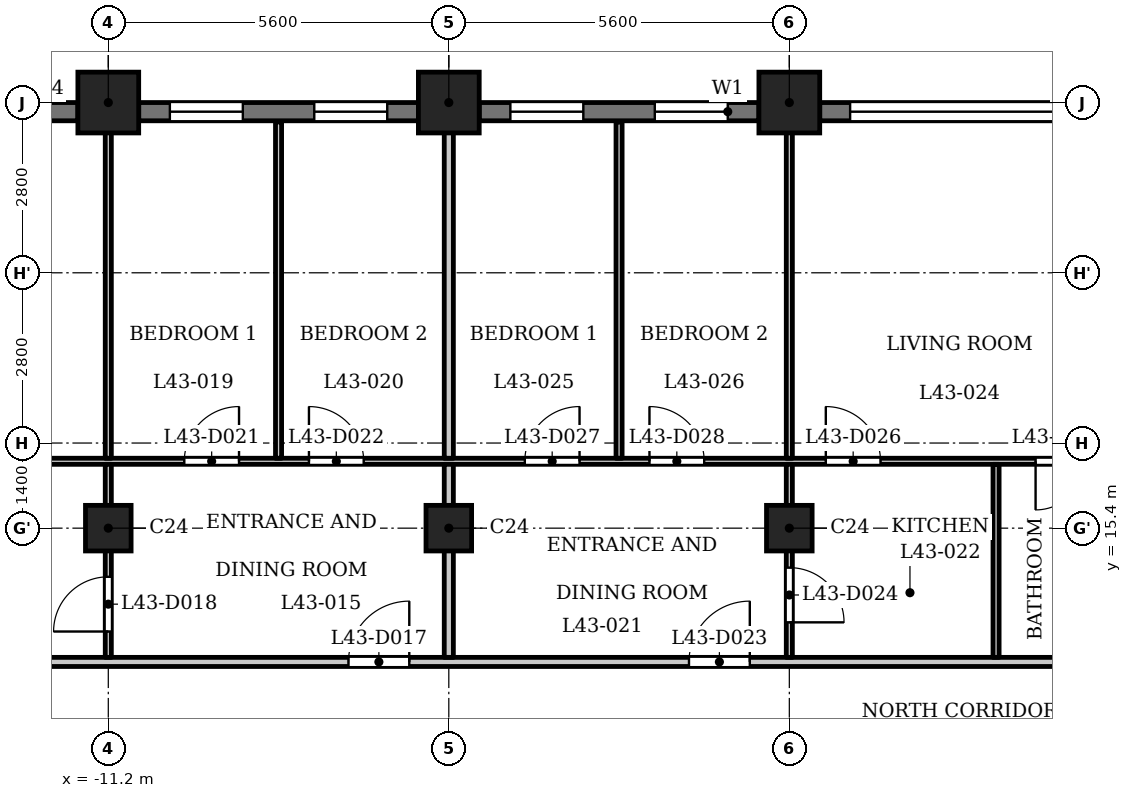
"""IFC4 building model, lengths in metres.
Left out: names, types, materials, properties, quantities, classifications, styles, units other than length and angle.
Written with IfcOpenShell. Run it as: python <this file> out.ifc"""

import sys

from ifc_helpers import new_model, si_unit, direction, frame, frame_2d, origin, origin_2d, place, context, subcontext, project, spatial, rectangle, extrude, element, fill, save


model = new_model("IFC4")
c1 = context("Model", 3, precision=1e-05, world=origin(), true_north=direction((0.0, 1.0)))
c2 = subcontext(c1, "Body", "Model", "MODEL_VIEW")
j1 = project(units=[si_unit("LENGTHUNIT", "METRE"), si_unit("PLANEANGLEUNIT", "RADIAN")], contexts=[c1])
p1 = place(None, origin())
s1 = spatial("IfcSite", under=j1, at=p1, CompositionType="ELEMENT")
p2 = place(p1, origin())
s2 = spatial("IfcBuilding", under=s1, at=p2, CompositionType="ELEMENT")
p3 = place(p2, frame((0.0, 0.0, 167.6)))
s3 = spatial("IfcBuildingStorey", under=s2, at=p3, CompositionType="ELEMENT", Elevation=167.6)
for number, where, z_axis, x_axis in (
    (1, (0.0, 22.4, 0.0), (0.0, 0.0, 1.0), (1.0, 0.0, 0.0)),
    (2, (-5.6, 22.4, 0.0), (0.0, 0.0, 1.0), (1.0, 0.0, 0.0)),
    (3, (-11.2, 22.4, 0.0), (0.0, 0.0, 1.0), (1.0, 0.0, 0.0)),
):
    element("IfcColumn", number, at=place(p3, frame(where, z_axis=z_axis, x_axis=x_axis)), inside=s3, PredefinedType="COLUMN", context=c2, shape_type="SweptSolid", body=[
        extrude(rectangle(XDim=1.0, YDim=1.0, at=origin_2d()), origin(), (0.0, 0.0, 1.0), 3.5),
    ])
for number, where, z_axis, x_axis in (
    (4, (-11.2, 15.4, 0.0), (0.0, 0.0, 1.0), (1.0, 0.0, 0.0)),
    (5, (-5.6, 15.4, 0.0), (0.0, 0.0, 1.0), (1.0, 0.0, 0.0)),
    (6, (0.0, 15.4, 0.0), (0.0, 0.0, 1.0), (1.0, 0.0, 0.0)),
):
    element("IfcColumn", number, at=place(p3, frame(where, z_axis=z_axis, x_axis=x_axis)), inside=s3, PredefinedType="COLUMN", context=c2, shape_type="SweptSolid", body=[
        extrude(rectangle(XDim=0.75, YDim=0.75, at=origin_2d()), origin(), (0.0, 0.0, 1.0), 3.5),
    ])
p4 = place(p3, frame((5.1, 22.25, 0.0), z_axis=(0.0, 0.0, 1.0), x_axis=(-1.0, 0.0, 0.0)))
e7 = element("IfcWall", 7, at=p4, inside=s3, PredefinedType="SOLIDWALL", context=c2, shape_type="SweptSolid", body=[
    extrude(rectangle(XDim=4.6, YDim=0.3, at=frame_2d((2.3, 0.0))), origin(), (0.0, 0.0, 1.0), 2.45),
])
p5 = place(p4, frame((0.5, 0.0, 1.2)))
e8 = element("IfcOpeningElement", 8, at=p5, cuts=e7, PredefinedType="OPENING", context=c2, shape_type="SweptSolid", body=[
    extrude(rectangle(XDim=3.6, YDim=0.95, at=frame_2d((1.8, 0.475))), frame((0.0, 0.16, 0.0), z_axis=(0.0, -1.0, 0.0), x_axis=(1.0, 0.0, 0.0)), (0.0, 0.0, 1.0), 0.32),
])
p6 = place(p3, frame((-0.5, 22.25, 0.0), z_axis=(0.0, 0.0, 1.0), x_axis=(-1.0, 0.0, 0.0)))
e9 = element("IfcWall", 9, at=p6, inside=s3, PredefinedType="SOLIDWALL", context=c2, shape_type="SweptSolid", body=[
    extrude(rectangle(XDim=4.6, YDim=0.3, at=frame_2d((2.3, 0.0))), origin(), (0.0, 0.0, 1.0), 2.45),
])
p7 = place(p6, frame((0.512, 0.0, 0.6)))
e10 = element("IfcOpeningElement", 10, at=p7, cuts=e9, PredefinedType="OPENING", context=c2, shape_type="SweptSolid", body=[
    extrude(rectangle(XDim=1.2, YDim=1.55, at=frame_2d((0.6, 0.775))), frame((0.0, 0.16, 0.0), z_axis=(0.0, -1.0, 0.0), x_axis=(1.0, 0.0, 0.0)), (0.0, 0.0, 1.0), 0.32),
])
p8 = place(p6, frame((2.887, 0.0, 0.6)))
e11 = element("IfcOpeningElement", 11, at=p8, cuts=e9, PredefinedType="OPENING", context=c2, shape_type="SweptSolid", body=[
    extrude(rectangle(XDim=1.2, YDim=1.55, at=frame_2d((0.6, 0.775))), frame((0.0, 0.16, 0.0), z_axis=(0.0, -1.0, 0.0), x_axis=(1.0, 0.0, 0.0)), (0.0, 0.0, 1.0), 0.32),
])
p9 = place(p3, frame((-6.1, 22.25, 0.0), z_axis=(0.0, 0.0, 1.0), x_axis=(-1.0, 0.0, 0.0)))
e12 = element("IfcWall", 12, at=p9, inside=s3, PredefinedType="SOLIDWALL", context=c2, shape_type="SweptSolid", body=[
    extrude(rectangle(XDim=4.6, YDim=0.3, at=frame_2d((2.3, 0.0))), origin(), (0.0, 0.0, 1.0), 2.45),
])
p10 = place(p9, frame((0.512, 0.0, 0.6)))
e13 = element("IfcOpeningElement", 13, at=p10, cuts=e12, PredefinedType="OPENING", context=c2, shape_type="SweptSolid", body=[
    extrude(rectangle(XDim=1.2, YDim=1.55, at=frame_2d((0.6, 0.775))), frame((0.0, 0.16, 0.0), z_axis=(0.0, -1.0, 0.0), x_axis=(1.0, 0.0, 0.0)), (0.0, 0.0, 1.0), 0.32),
])
p11 = place(p9, frame((2.887, 0.0, 0.6)))
e14 = element("IfcOpeningElement", 14, at=p11, cuts=e12, PredefinedType="OPENING", context=c2, shape_type="SweptSolid", body=[
    extrude(rectangle(XDim=1.2, YDim=1.55, at=frame_2d((0.6, 0.775))), frame((0.0, 0.16, 0.0), z_axis=(0.0, -1.0, 0.0), x_axis=(1.0, 0.0, 0.0)), (0.0, 0.0, 1.0), 0.32),
])
p12 = place(p3, frame((-11.7, 22.25, 0.0), z_axis=(0.0, 0.0, 1.0), x_axis=(-1.0, 0.0, 0.0)))
e15 = element("IfcWall", 15, at=p12, inside=s3, PredefinedType="SOLIDWALL", context=c2, shape_type="SweptSolid", body=[
    extrude(rectangle(XDim=4.6, YDim=0.3, at=frame_2d((2.3, 0.0))), origin(), (0.0, 0.0, 1.0), 2.45),
])
p13 = place(p12, frame((0.5, 0.0, 1.2)))
e16 = element("IfcOpeningElement", 16, at=p13, cuts=e15, PredefinedType="OPENING", context=c2, shape_type="SweptSolid", body=[
    extrude(rectangle(XDim=3.6, YDim=0.95, at=frame_2d((1.8, 0.475))), frame((0.0, 0.16, 0.0), z_axis=(0.0, -1.0, 0.0), x_axis=(1.0, 0.0, 0.0)), (0.0, 0.0, 1.0), 0.32),
])
p14 = place(p3, frame((-17.4, 13.2, 0.0), z_axis=(0.0, 0.0, 1.0), x_axis=(1.0, 0.0, 0.0)))
e17 = element("IfcWall", 17, at=p14, inside=s3, PredefinedType="PARTITIONING", context=c2, shape_type="SweptSolid", body=[
    extrude(rectangle(XDim=34.8, YDim=0.15, at=frame_2d((17.4, 0.0))), origin(), (0.0, 0.0, 1.0), 3.2),
])
p15 = place(p14, frame((0.25, 0.0, 0.0)))
e18 = element("IfcOpeningElement", 18, at=p15, cuts=e17, PredefinedType="OPENING", context=c2, shape_type="SweptSolid", body=[
    extrude(rectangle(XDim=1.0, YDim=2.1, at=frame_2d((0.5, 1.05))), frame((0.0, 0.085, 0.0), z_axis=(0.0, -1.0, 0.0), x_axis=(1.0, 0.0, 0.0)), (0.0, 0.0, 1.0), 0.17),
])
p16 = place(p14, frame((33.65, 0.0, 0.0)))
e19 = element("IfcOpeningElement", 19, at=p16, cuts=e17, PredefinedType="OPENING", context=c2, shape_type="SweptSolid", body=[
    extrude(rectangle(XDim=1.0, YDim=2.1, at=frame_2d((0.5, 1.05))), frame((0.0, 0.085, 0.0), z_axis=(0.0, -1.0, 0.0), x_axis=(1.0, 0.0, 0.0)), (0.0, 0.0, 1.0), 0.17),
])
p17 = place(p14, frame((10.15, 0.0, 0.0)))
e20 = element("IfcOpeningElement", 20, at=p17, cuts=e17, PredefinedType="OPENING", context=c2, shape_type="SweptSolid", body=[
    extrude(rectangle(XDim=1.0, YDim=2.1, at=frame_2d((0.5, 1.05))), frame((0.0, 0.085, 0.0), z_axis=(0.0, -1.0, 0.0), x_axis=(1.0, 0.0, 0.0)), (0.0, 0.0, 1.0), 0.17),
])
p18 = place(p14, frame((15.75, 0.0, 0.0)))
e21 = element("IfcOpeningElement", 21, at=p18, cuts=e17, PredefinedType="OPENING", context=c2, shape_type="SweptSolid", body=[
    extrude(rectangle(XDim=1.0, YDim=2.1, at=frame_2d((0.5, 1.05))), frame((0.0, 0.085, 0.0), z_axis=(0.0, -1.0, 0.0), x_axis=(1.0, 0.0, 0.0)), (0.0, 0.0, 1.0), 0.17),
])
p19 = place(p14, frame((24.95, 0.0, 0.0)))
e22 = element("IfcOpeningElement", 22, at=p19, cuts=e17, PredefinedType="OPENING", context=c2, shape_type="SweptSolid", body=[
    extrude(rectangle(XDim=1.0, YDim=2.1, at=frame_2d((0.5, 1.05))), frame((0.0, 0.085, 0.0), z_axis=(0.0, -1.0, 0.0), x_axis=(1.0, 0.0, 0.0)), (0.0, 0.0, 1.0), 0.17),
])
p20 = place(p14, frame((29.95, 0.0, 0.0)))
e23 = element("IfcOpeningElement", 23, at=p20, cuts=e17, PredefinedType="OPENING", context=c2, shape_type="SweptSolid", body=[
    extrude(rectangle(XDim=1.0, YDim=2.1, at=frame_2d((0.5, 1.05))), frame((0.0, 0.085, 0.0), z_axis=(0.0, -1.0, 0.0), x_axis=(1.0, 0.0, 0.0)), (0.0, 0.0, 1.0), 0.17),
])
p21 = place(p3, frame((-16.725, 16.5, 0.0), z_axis=(0.0, 0.0, 1.0), x_axis=(1.0, 0.0, 0.0)))
e24 = element("IfcWall", 24, at=p21, inside=s3, PredefinedType="PARTITIONING", context=c2, shape_type="SweptSolid", body=[
    extrude(rectangle(XDim=33.45, YDim=0.1, at=frame_2d((16.725, 0.0))), origin(), (0.0, 0.0, 1.0), 3.2),
])
p22 = place(p21, frame((0.575, 0.0, 0.0)))
e25 = element("IfcOpeningElement", 25, at=p22, cuts=e24, PredefinedType="OPENING", context=c2, shape_type="SweptSolid", body=[
    extrude(rectangle(XDim=0.8, YDim=2.1, at=frame_2d((0.4, 1.05))), frame((0.0, 0.06, 0.0), z_axis=(0.0, -1.0, 0.0), x_axis=(1.0, 0.0, 0.0)), (0.0, 0.0, 1.0), 0.12),
])
p23 = place(p21, frame((3.225, 0.0, 0.0)))
e26 = element("IfcOpeningElement", 26, at=p23, cuts=e24, PredefinedType="OPENING", context=c2, shape_type="SweptSolid", body=[
    extrude(rectangle(XDim=0.9, YDim=2.1, at=frame_2d((0.45, 1.05))), frame((0.0, 0.06, 0.0), z_axis=(0.0, -1.0, 0.0), x_axis=(1.0, 0.0, 0.0)), (0.0, 0.0, 1.0), 0.12),
])
p24 = place(p21, frame((6.775, 0.0, 0.0)))
e27 = element("IfcOpeningElement", 27, at=p24, cuts=e24, PredefinedType="OPENING", context=c2, shape_type="SweptSolid", body=[
    extrude(rectangle(XDim=0.9, YDim=2.1, at=frame_2d((0.45, 1.05))), frame((0.0, 0.06, 0.0), z_axis=(0.0, -1.0, 0.0), x_axis=(1.0, 0.0, 0.0)), (0.0, 0.0, 1.0), 0.12),
])
p25 = place(p21, frame((8.825, 0.0, 0.0)))
e28 = element("IfcOpeningElement", 28, at=p25, cuts=e24, PredefinedType="OPENING", context=c2, shape_type="SweptSolid", body=[
    extrude(rectangle(XDim=0.9, YDim=2.1, at=frame_2d((0.45, 1.05))), frame((0.0, 0.06, 0.0), z_axis=(0.0, -1.0, 0.0), x_axis=(1.0, 0.0, 0.0)), (0.0, 0.0, 1.0), 0.12),
])
p26 = place(p21, frame((20.775, 0.0, 0.0)))
e29 = element("IfcOpeningElement", 29, at=p26, cuts=e24, PredefinedType="OPENING", context=c2, shape_type="SweptSolid", body=[
    extrude(rectangle(XDim=0.8, YDim=2.1, at=frame_2d((0.4, 1.05))), frame((0.0, 0.06, 0.0), z_axis=(0.0, -1.0, 0.0), x_axis=(1.0, 0.0, 0.0)), (0.0, 0.0, 1.0), 0.12),
])
p27 = place(p21, frame((17.325, 0.0, 0.0)))
e30 = element("IfcOpeningElement", 30, at=p27, cuts=e24, PredefinedType="OPENING", context=c2, shape_type="SweptSolid", body=[
    extrude(rectangle(XDim=0.9, YDim=2.1, at=frame_2d((0.45, 1.05))), frame((0.0, 0.06, 0.0), z_axis=(0.0, -1.0, 0.0), x_axis=(1.0, 0.0, 0.0)), (0.0, 0.0, 1.0), 0.12),
])
p28 = place(p21, frame((12.375, 0.0, 0.0)))
e31 = element("IfcOpeningElement", 31, at=p28, cuts=e24, PredefinedType="OPENING", context=c2, shape_type="SweptSolid", body=[
    extrude(rectangle(XDim=0.9, YDim=2.1, at=frame_2d((0.45, 1.05))), frame((0.0, 0.06, 0.0), z_axis=(0.0, -1.0, 0.0), x_axis=(1.0, 0.0, 0.0)), (0.0, 0.0, 1.0), 0.12),
])
p29 = place(p21, frame((14.425, 0.0, 0.0)))
e32 = element("IfcOpeningElement", 32, at=p29, cuts=e24, PredefinedType="OPENING", context=c2, shape_type="SweptSolid", body=[
    extrude(rectangle(XDim=0.9, YDim=2.1, at=frame_2d((0.45, 1.05))), frame((0.0, 0.06, 0.0), z_axis=(0.0, -1.0, 0.0), x_axis=(1.0, 0.0, 0.0)), (0.0, 0.0, 1.0), 0.12),
])
p30 = place(p21, frame((26.575, 0.0, 0.0)))
e33 = element("IfcOpeningElement", 33, at=p30, cuts=e24, PredefinedType="OPENING", context=c2, shape_type="SweptSolid", body=[
    extrude(rectangle(XDim=0.8, YDim=2.1, at=frame_2d((0.4, 1.05))), frame((0.0, 0.06, 0.0), z_axis=(0.0, -1.0, 0.0), x_axis=(1.0, 0.0, 0.0)), (0.0, 0.0, 1.0), 0.12),
])
p31 = place(p21, frame((23.775, 0.0, 0.0)))
e34 = element("IfcOpeningElement", 34, at=p31, cuts=e24, PredefinedType="OPENING", context=c2, shape_type="SweptSolid", body=[
    extrude(rectangle(XDim=0.9, YDim=2.1, at=frame_2d((0.45, 1.05))), frame((0.0, 0.06, 0.0), z_axis=(0.0, -1.0, 0.0), x_axis=(1.0, 0.0, 0.0)), (0.0, 0.0, 1.0), 0.12),
])
p32 = place(p21, frame((32.075, 0.0, 0.0)))
e35 = element("IfcOpeningElement", 35, at=p32, cuts=e24, PredefinedType="OPENING", context=c2, shape_type="SweptSolid", body=[
    extrude(rectangle(XDim=0.8, YDim=2.1, at=frame_2d((0.4, 1.05))), frame((0.0, 0.06, 0.0), z_axis=(0.0, -1.0, 0.0), x_axis=(1.0, 0.0, 0.0)), (0.0, 0.0, 1.0), 0.12),
])
p33 = place(p21, frame((29.375, 0.0, 0.0)))
e36 = element("IfcOpeningElement", 36, at=p33, cuts=e24, PredefinedType="OPENING", context=c2, shape_type="SweptSolid", body=[
    extrude(rectangle(XDim=0.9, YDim=2.1, at=frame_2d((0.45, 1.05))), frame((0.0, 0.06, 0.0), z_axis=(0.0, -1.0, 0.0), x_axis=(1.0, 0.0, 0.0)), (0.0, 0.0, 1.0), 0.12),
])
p34 = place(p3, frame((-11.2, 13.275, 0.0), z_axis=(0.0, 0.0, 1.0), x_axis=(0.0, 1.0, 0.0)))
e37 = element("IfcWall", 37, at=p34, inside=s3, PredefinedType="PARTITIONING", context=c2, shape_type="SweptSolid", body=[
    extrude(rectangle(XDim=3.175, YDim=0.1, at=frame_2d((1.587, 0.0))), origin(), (0.0, 0.0, 1.0), 3.2),
])
p35 = place(p34, frame((0.425, 0.0, 0.0)))
e38 = element("IfcOpeningElement", 38, at=p35, cuts=e37, PredefinedType="OPENING", context=c2, shape_type="SweptSolid", body=[
    extrude(rectangle(XDim=0.9, YDim=2.1, at=frame_2d((0.45, 1.05))), frame((0.0, 0.06, 0.0), z_axis=(0.0, -1.0, 0.0), x_axis=(1.0, 0.0, 0.0)), (0.0, 0.0, 1.0), 0.12),
])
p36 = place(p3, frame((-11.2, 16.55, 0.0), z_axis=(0.0, 0.0, 1.0), x_axis=(0.0, 1.0, 0.0)))
e39 = element("IfcWall", 39, at=p36, inside=s3, PredefinedType="PARTITIONING", context=c2, shape_type="SweptSolid", body=[
    extrude(rectangle(XDim=6.33, YDim=0.1, at=frame_2d((3.165, 0.0))), origin(), (0.0, 0.0, 1.0), 3.2),
])
p37 = place(p3, frame((-8.4, 16.55, 0.0), z_axis=(0.0, 0.0, 1.0), x_axis=(0.0, 1.0, 0.0)))
e40 = element("IfcWall", 40, at=p37, inside=s3, PredefinedType="PARTITIONING", context=c2, shape_type="SweptSolid", body=[
    extrude(rectangle(XDim=5.53, YDim=0.1, at=frame_2d((2.765, 0.0))), origin(), (0.0, 0.0, 1.0), 3.2),
])
p38 = place(p3, frame((-5.6, 13.275, 0.0), z_axis=(0.0, 0.0, 1.0), x_axis=(0.0, 1.0, 0.0)))
e41 = element("IfcWall", 41, at=p38, inside=s3, PredefinedType="PARTITIONING", context=c2, shape_type="SweptSolid", body=[
    extrude(rectangle(XDim=3.175, YDim=0.15, at=frame_2d((1.587, 0.0))), origin(), (0.0, 0.0, 1.0), 3.2),
])
p39 = place(p3, frame((-5.6, 16.55, 0.0), z_axis=(0.0, 0.0, 1.0), x_axis=(0.0, 1.0, 0.0)))
e42 = element("IfcWall", 42, at=p39, inside=s3, PredefinedType="PARTITIONING", context=c2, shape_type="SweptSolid", body=[
    extrude(rectangle(XDim=6.33, YDim=0.15, at=frame_2d((3.165, 0.0))), origin(), (0.0, 0.0, 1.0), 3.2),
])
p40 = place(p3, frame((-2.8, 16.55, 0.0), z_axis=(0.0, 0.0, 1.0), x_axis=(0.0, 1.0, 0.0)))
e43 = element("IfcWall", 43, at=p40, inside=s3, PredefinedType="PARTITIONING", context=c2, shape_type="SweptSolid", body=[
    extrude(rectangle(XDim=5.53, YDim=0.1, at=frame_2d((2.765, 0.0))), origin(), (0.0, 0.0, 1.0), 3.2),
])
p41 = place(p3, frame((0.0, 13.275, 0.0), z_axis=(0.0, 0.0, 1.0), x_axis=(0.0, 1.0, 0.0)))
e44 = element("IfcWall", 44, at=p41, inside=s3, PredefinedType="PARTITIONING", context=c2, shape_type="SweptSolid", body=[
    extrude(rectangle(XDim=3.175, YDim=0.1, at=frame_2d((1.587, 0.0))), origin(), (0.0, 0.0, 1.0), 3.2),
])
p42 = place(p41, frame((0.576, 0.0, 0.0)))
e45 = element("IfcOpeningElement", 45, at=p42, cuts=e44, PredefinedType="OPENING", context=c2, shape_type="SweptSolid", body=[
    extrude(rectangle(XDim=0.9, YDim=2.1, at=frame_2d((0.45, 1.05))), frame((0.0, 0.06, 0.0), z_axis=(0.0, -1.0, 0.0), x_axis=(1.0, 0.0, 0.0)), (0.0, 0.0, 1.0), 0.12),
])
p43 = place(p3, frame((0.0, 16.55, 0.0), z_axis=(0.0, 0.0, 1.0), x_axis=(0.0, 1.0, 0.0)))
e46 = element("IfcWall", 46, at=p43, inside=s3, PredefinedType="PARTITIONING", context=c2, shape_type="SweptSolid", body=[
    extrude(rectangle(XDim=6.33, YDim=0.1, at=frame_2d((3.165, 0.0))), origin(), (0.0, 0.0, 1.0), 3.2),
])
p44 = place(p3, frame((3.4, 13.275, 0.0), z_axis=(0.0, 0.0, 1.0), x_axis=(0.0, 1.0, 0.0)))
e47 = element("IfcWall", 47, at=p44, inside=s3, PredefinedType="PARTITIONING", context=c2, shape_type="SweptSolid", body=[
    extrude(rectangle(XDim=3.175, YDim=0.1, at=frame_2d((1.587, 0.0))), origin(), (0.0, 0.0, 1.0), 3.2),
])
p45 = place(p17, origin())
e48 = element("IfcDoor", 48, at=p45, inside=s3, OperationType="SINGLE_SWING_LEFT", PredefinedType="DOOR", context=c2, shape_type="SweptSolid", body=[
    extrude(rectangle(XDim=1.0, YDim=2.1, at=frame_2d((0.5, 1.05))), frame((0.0, 0.025, 0.0), z_axis=(0.0, -1.0, 0.0), x_axis=(1.0, 0.0, 0.0)), (0.0, 0.0, 1.0), 0.05),
])
fill(e20, e48)
p46 = place(p35, origin())
e49 = element("IfcDoor", 49, at=p46, inside=s3, OperationType="SINGLE_SWING_RIGHT", PredefinedType="DOOR", context=c2, shape_type="SweptSolid", body=[
    extrude(rectangle(XDim=0.9, YDim=2.1, at=frame_2d((0.45, 1.05))), frame((0.0, 0.025, 0.0), z_axis=(0.0, -1.0, 0.0), x_axis=(1.0, 0.0, 0.0)), (0.0, 0.0, 1.0), 0.05),
])
fill(e38, e49)
p47 = place(p24, origin())
e50 = element("IfcDoor", 50, at=p47, inside=s3, OperationType="SINGLE_SWING_LEFT", PredefinedType="DOOR", context=c2, shape_type="SweptSolid", body=[
    extrude(rectangle(XDim=0.9, YDim=2.1, at=frame_2d((0.45, 1.05))), frame((0.0, 0.025, 0.0), z_axis=(0.0, -1.0, 0.0), x_axis=(1.0, 0.0, 0.0)), (0.0, 0.0, 1.0), 0.05),
])
fill(e27, e50)
p48 = place(p25, origin())
e51 = element("IfcDoor", 51, at=p48, inside=s3, OperationType="SINGLE_SWING_RIGHT", PredefinedType="DOOR", context=c2, shape_type="SweptSolid", body=[
    extrude(rectangle(XDim=0.9, YDim=2.1, at=frame_2d((0.45, 1.05))), frame((0.0, 0.025, 0.0), z_axis=(0.0, -1.0, 0.0), x_axis=(1.0, 0.0, 0.0)), (0.0, 0.0, 1.0), 0.05),
])
fill(e28, e51)
p49 = place(p18, origin())
e52 = element("IfcDoor", 52, at=p49, inside=s3, OperationType="SINGLE_SWING_LEFT", PredefinedType="DOOR", context=c2, shape_type="SweptSolid", body=[
    extrude(rectangle(XDim=1.0, YDim=2.1, at=frame_2d((0.5, 1.05))), frame((0.0, 0.025, 0.0), z_axis=(0.0, -1.0, 0.0), x_axis=(1.0, 0.0, 0.0)), (0.0, 0.0, 1.0), 0.05),
])
fill(e21, e52)
p50 = place(p42, origin())
e53 = element("IfcDoor", 53, at=p50, inside=s3, OperationType="SINGLE_SWING_LEFT", PredefinedType="DOOR", context=c2, shape_type="SweptSolid", body=[
    extrude(rectangle(XDim=0.9, YDim=2.1, at=frame_2d((0.45, 1.05))), frame((0.0, 0.025, 0.0), z_axis=(0.0, -1.0, 0.0), x_axis=(1.0, 0.0, 0.0)), (0.0, 0.0, 1.0), 0.05),
])
fill(e45, e53)
p51 = place(p26, origin())
e54 = element("IfcDoor", 54, at=p51, inside=s3, OperationType="SINGLE_SWING_LEFT", PredefinedType="DOOR", context=c2, shape_type="SweptSolid", body=[
    extrude(rectangle(XDim=0.8, YDim=2.1, at=frame_2d((0.4, 1.05))), frame((0.0, 0.025, 0.0), z_axis=(0.0, -1.0, 0.0), x_axis=(1.0, 0.0, 0.0)), (0.0, 0.0, 1.0), 0.05),
])
fill(e29, e54)
p52 = place(p27, origin())
e55 = element("IfcDoor", 55, at=p52, inside=s3, OperationType="SINGLE_SWING_RIGHT", PredefinedType="DOOR", context=c2, shape_type="SweptSolid", body=[
    extrude(rectangle(XDim=0.9, YDim=2.1, at=frame_2d((0.45, 1.05))), frame((0.0, 0.025, 0.0), z_axis=(0.0, -1.0, 0.0), x_axis=(1.0, 0.0, 0.0)), (0.0, 0.0, 1.0), 0.05),
])
fill(e30, e55)
p53 = place(p28, origin())
e56 = element("IfcDoor", 56, at=p53, inside=s3, OperationType="SINGLE_SWING_LEFT", PredefinedType="DOOR", context=c2, shape_type="SweptSolid", body=[
    extrude(rectangle(XDim=0.9, YDim=2.1, at=frame_2d((0.45, 1.05))), frame((0.0, 0.025, 0.0), z_axis=(0.0, -1.0, 0.0), x_axis=(1.0, 0.0, 0.0)), (0.0, 0.0, 1.0), 0.05),
])
fill(e31, e56)
p54 = place(p29, origin())
e57 = element("IfcDoor", 57, at=p54, inside=s3, OperationType="SINGLE_SWING_RIGHT", PredefinedType="DOOR", context=c2, shape_type="SweptSolid", body=[
    extrude(rectangle(XDim=0.9, YDim=2.1, at=frame_2d((0.45, 1.05))), frame((0.0, 0.025, 0.0), z_axis=(0.0, -1.0, 0.0), x_axis=(1.0, 0.0, 0.0)), (0.0, 0.0, 1.0), 0.05),
])
fill(e32, e57)
p55 = place(p5, origin())
e58 = element("IfcWindow", 58, at=p55, inside=s3, PartitioningType="SINGLE_PANEL", PredefinedType="WINDOW", context=c2, shape_type="SweptSolid", body=[
    extrude(rectangle(XDim=3.6, YDim=0.95, at=frame_2d((1.8, 0.475))), frame((0.0, 0.03, 0.0), z_axis=(0.0, -1.0, 0.0), x_axis=(1.0, 0.0, 0.0)), (0.0, 0.0, 1.0), 0.06),
])
fill(e8, e58)
p56 = place(p7, origin())
e59 = element("IfcWindow", 59, at=p56, inside=s3, PartitioningType="SINGLE_PANEL", PredefinedType="WINDOW", context=c2, shape_type="SweptSolid", body=[
    extrude(rectangle(XDim=1.2, YDim=1.55, at=frame_2d((0.6, 0.775))), frame((0.0, 0.03, 0.0), z_axis=(0.0, -1.0, 0.0), x_axis=(1.0, 0.0, 0.0)), (0.0, 0.0, 1.0), 0.06),
])
fill(e10, e59)
p57 = place(p8, origin())
e60 = element("IfcWindow", 60, at=p57, inside=s3, PartitioningType="SINGLE_PANEL", PredefinedType="WINDOW", context=c2, shape_type="SweptSolid", body=[
    extrude(rectangle(XDim=1.2, YDim=1.55, at=frame_2d((0.6, 0.775))), frame((0.0, 0.03, 0.0), z_axis=(0.0, -1.0, 0.0), x_axis=(1.0, 0.0, 0.0)), (0.0, 0.0, 1.0), 0.06),
])
fill(e11, e60)
p58 = place(p10, origin())
e61 = element("IfcWindow", 61, at=p58, inside=s3, PartitioningType="SINGLE_PANEL", PredefinedType="WINDOW", context=c2, shape_type="SweptSolid", body=[
    extrude(rectangle(XDim=1.2, YDim=1.55, at=frame_2d((0.6, 0.775))), frame((0.0, 0.03, 0.0), z_axis=(0.0, -1.0, 0.0), x_axis=(1.0, 0.0, 0.0)), (0.0, 0.0, 1.0), 0.06),
])
fill(e13, e61)
p59 = place(p11, origin())
e62 = element("IfcWindow", 62, at=p59, inside=s3, PartitioningType="SINGLE_PANEL", PredefinedType="WINDOW", context=c2, shape_type="SweptSolid", body=[
    extrude(rectangle(XDim=1.2, YDim=1.55, at=frame_2d((0.6, 0.775))), frame((0.0, 0.03, 0.0), z_axis=(0.0, -1.0, 0.0), x_axis=(1.0, 0.0, 0.0)), (0.0, 0.0, 1.0), 0.06),
])
fill(e14, e62)
save(model, sys.argv[1])
